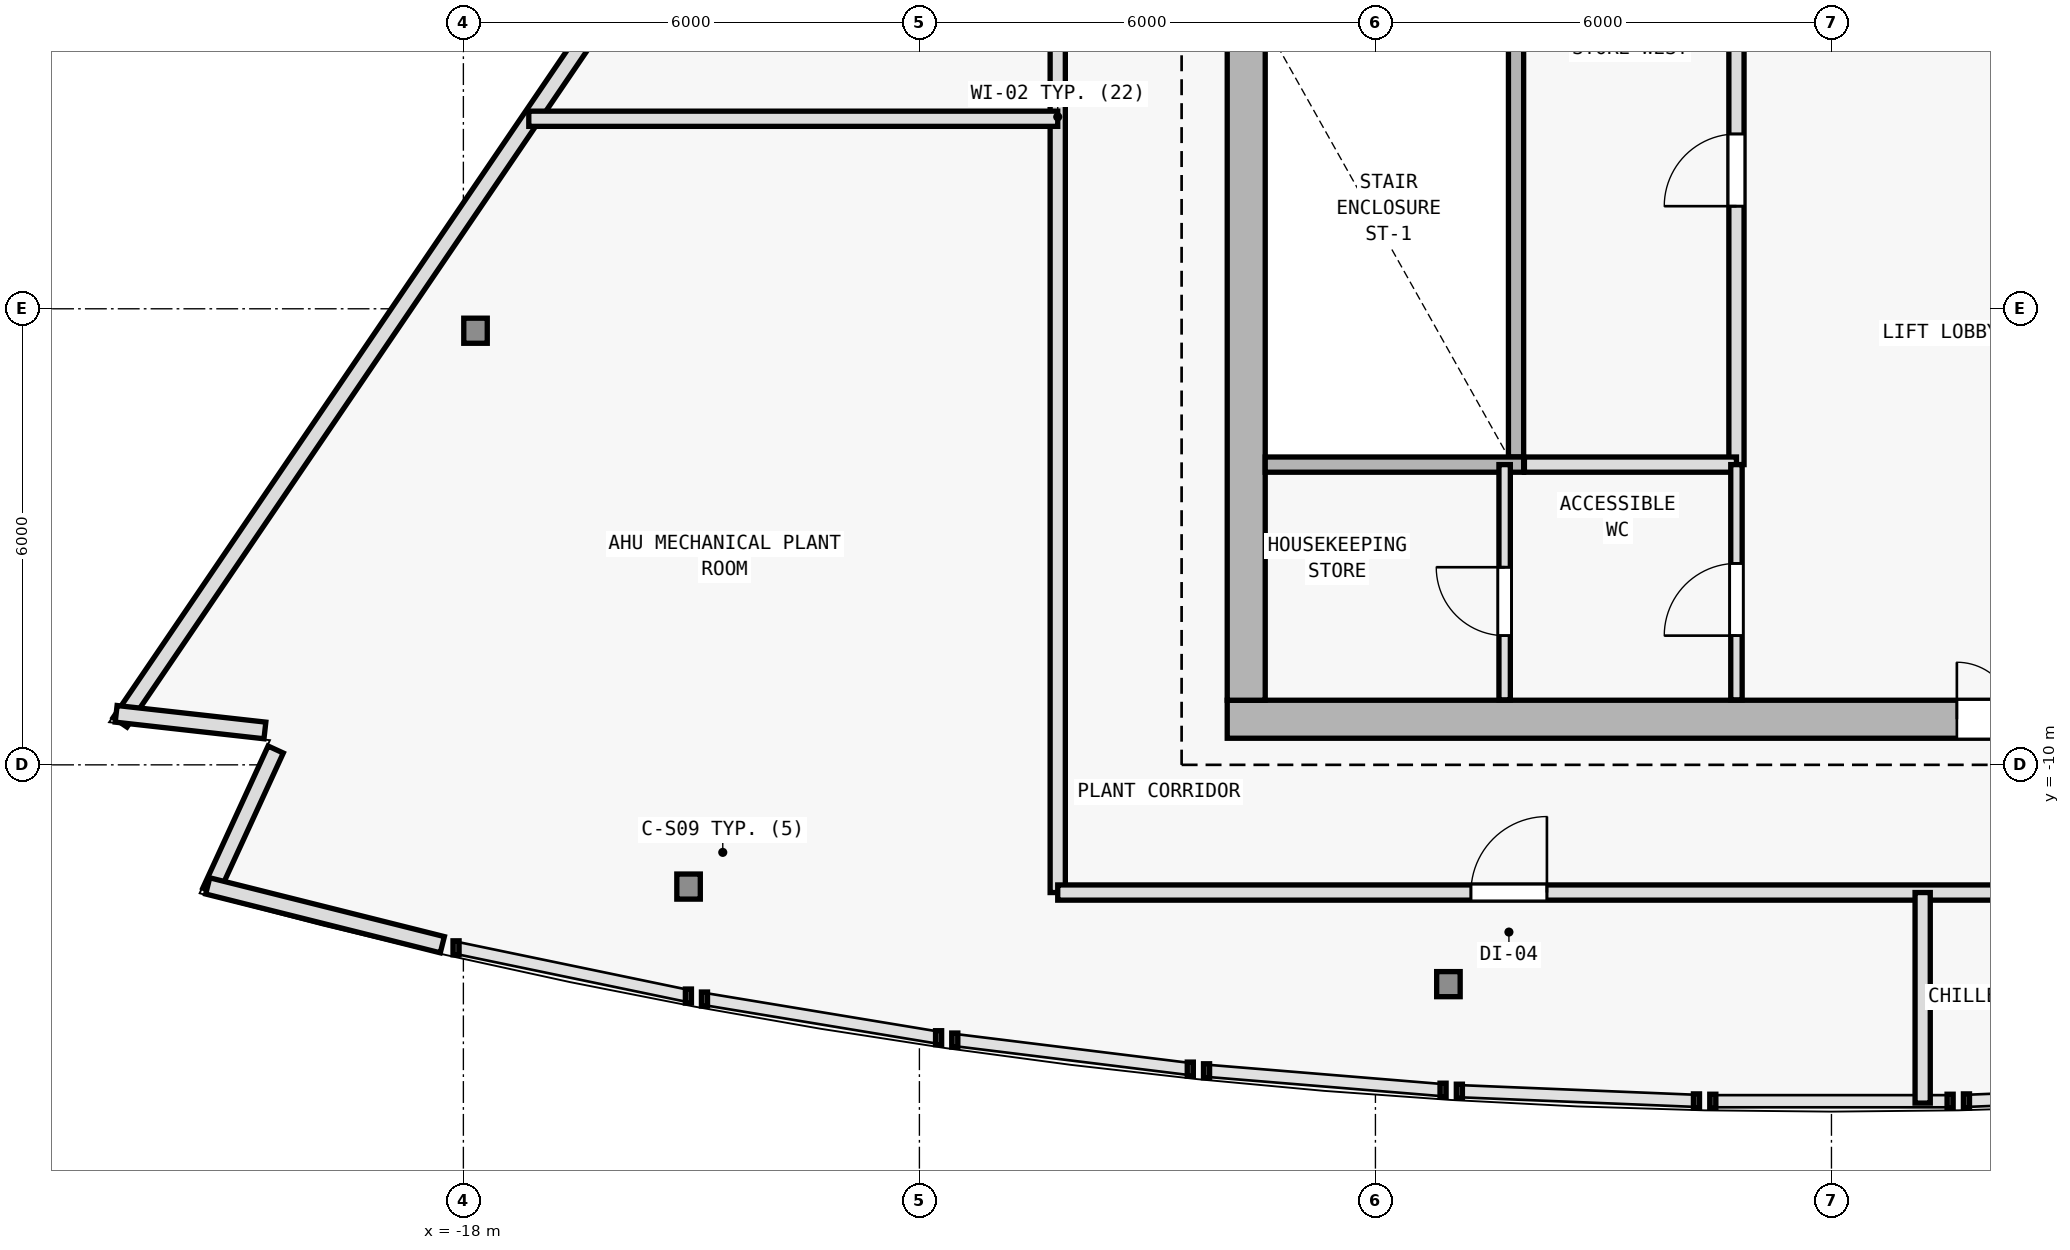
"""IFC4 building model, lengths in metres.
Left out: names, types, materials, properties, quantities, classifications, styles, units other than length and angle.
Written with IfcOpenShell. Run it as: python <this file> out.ifc"""

import sys

from ifc_helpers import new_model, si_unit, direction, frame, frame_2d, origin, origin_2d, place, context, subcontext, project, spatial, rectangle, i_section, extrude, element, fill, save


model = new_model("IFC4")
c1 = context("Model", 3, precision=1e-05, world=origin(), true_north=direction((0.0, 1.0)))
c2 = subcontext(c1, "Body", "Model", "MODEL_VIEW")
j1 = project(units=[si_unit("LENGTHUNIT", "METRE"), si_unit("PLANEANGLEUNIT", "RADIAN")], contexts=[c1])
p1 = place(None, origin())
s1 = spatial("IfcSite", under=j1, at=p1, CompositionType="ELEMENT")
p2 = place(p1, origin())
s2 = spatial("IfcBuilding", under=s1, at=p2, CompositionType="ELEMENT")
p3 = place(p2, frame((0.0, 0.0, 319.2)))
s3 = spatial("IfcBuildingStorey", under=s2, at=p3, CompositionType="ELEMENT", Elevation=319.2)
for number, where, z_axis, x_axis in (
    (1, (-7.7, -9.4, 0.0), (0.0, 0.0, 1.0), (1.0, 0.0, 0.0)),
    (2, (0.0, -9.4, 0.0), (0.0, 0.0, 1.0), (1.0, 0.0, 0.0)),
):
    element("IfcColumn", number, at=place(p3, frame(where, z_axis=z_axis, x_axis=x_axis)), inside=s3, PredefinedType="COLUMN", context=c2, shape_type="SweptSolid", body=[
        extrude(i_section(OverallWidth=0.374, OverallDepth=0.372, WebThickness=0.012, FlangeThickness=0.02, FilletRadius=0.015, at=origin_2d()), origin(), (0.0, 0.0, 1.0), 3.6),
    ])
p4 = place(p3, frame((-15.037, -11.602, 0.0), z_axis=(0.0, 0.0, 1.0), x_axis=(1.0, 0.0, 0.0)))
e3 = element("IfcColumn", 3, at=p4, inside=s3, PredefinedType="COLUMN", context=c2, shape_type="SweptSolid", body=[
    extrude(i_section(OverallWidth=0.309, OverallDepth=0.33, WebThickness=0.011, FlangeThickness=0.019, FilletRadius=0.027, at=origin_2d()), origin(), (0.0, 0.0, 1.0), 1.847),
])
p5 = place(p3, frame((-5.04, -12.885, 0.0), z_axis=(0.0, 0.0, 1.0), x_axis=(1.0, 0.0, 0.0)))
e4 = element("IfcColumn", 4, at=p5, inside=s3, PredefinedType="COLUMN", context=c2, shape_type="SweptSolid", body=[
    extrude(i_section(OverallWidth=0.309, OverallDepth=0.33, WebThickness=0.011, FlangeThickness=0.019, FilletRadius=0.027, at=origin_2d()), origin(), (0.0, 0.0, 1.0), 3.34),
])
p6 = place(p3, frame((-17.84, -4.289, 0.0), z_axis=(0.0, 0.0, 1.0), x_axis=(1.0, 0.0, 0.0)))
e5 = element("IfcColumn", 5, at=p6, inside=s3, PredefinedType="COLUMN", context=c2, shape_type="SweptSolid", body=[
    extrude(i_section(OverallWidth=0.309, OverallDepth=0.33, WebThickness=0.011, FlangeThickness=0.019, FilletRadius=0.027, at=origin_2d()), origin(), (0.0, 0.0, 1.0), 1.23),
])
p7 = place(p3, frame((-22.517, -9.441, 0.0), z_axis=(0.0, 0.0, 1.0), x_axis=(0.562470833944, 0.826817126675, 0.0)))
e6 = element("IfcWall", 6, at=p7, inside=s3, PredefinedType="SOLIDWALL", context=c2, shape_type="SweptSolid", body=[
    extrude(rectangle(XDim=36.623, YDim=0.22, at=frame_2d((18.312, 0.0))), origin(), (0.0, 0.0, 1.0), 2.447),
])
p8 = place(p3, frame((-20.611, -9.548, 0.0), z_axis=(0.0, 0.0, 1.0), x_axis=(-0.993810947327, 0.111084656787, 0.0)))
e7 = element("IfcWall", 7, at=p8, inside=s3, PredefinedType="SOLIDWALL", context=c2, shape_type="SweptSolid", body=[
    extrude(rectangle(XDim=1.969, YDim=0.22, at=frame_2d((0.985, 0.0))), origin(), (0.0, 0.0, 1.0), 0.65),
])
p9 = place(p3, frame((-21.328, -11.667, 0.0), z_axis=(0.0, 0.0, 1.0), x_axis=(0.417431285032, 0.908708491364, 0.0)))
e8 = element("IfcWall", 8, at=p9, inside=s3, PredefinedType="SOLIDWALL", context=c2, shape_type="SweptSolid", body=[
    extrude(rectangle(XDim=2.056, YDim=0.22, at=frame_2d((1.028, 0.0))), origin(), (0.0, 0.0, 1.0), 0.65),
])
p10 = place(p3, frame((-18.277, -12.366, 0.0), z_axis=(0.0, 0.0, 1.0), x_axis=(-0.96999338674, 0.243131301319, 0.0)))
e9 = element("IfcWall", 9, at=p10, inside=s3, PredefinedType="SOLIDWALL", context=c2, shape_type="SweptSolid", body=[
    extrude(rectangle(XDim=3.182, YDim=0.22, at=frame_2d((1.591, 0.0))), origin(), (0.0, 0.0, 1.0), 0.775),
])
p11 = place(p3, frame((-7.95, -9.4, 0.0), z_axis=(0.0, 0.0, 1.0), x_axis=(1.0, 0.0, 0.0)))
e10 = element("IfcWall", 10, at=p11, inside=s3, PredefinedType="SHEAR", context=c2, shape_type="SweptSolid", body=[
    extrude(rectangle(XDim=15.9, YDim=0.5, at=frame_2d((7.95, 0.0))), origin(), (0.0, 0.0, 1.0), 2.4),
])
p12 = place(p11, frame((9.6, 0.0, 0.0)))
e11 = element("IfcOpeningElement", 11, at=p12, cuts=e10, PredefinedType="OPENING", context=c2, shape_type="SweptSolid", body=[
    extrude(rectangle(XDim=1.5, YDim=2.2, at=frame_2d((0.75, 1.1))), frame((0.0, 0.26, 0.0), z_axis=(0.0, -1.0, 0.0), x_axis=(1.0, 0.0, 0.0)), (0.0, 0.0, 1.0), 0.52),
])
p13 = place(p3, frame((-7.7, -9.15, 0.0), z_axis=(0.0, 0.0, 1.0), x_axis=(0.0, 1.0, 0.0)))
e12 = element("IfcWall", 12, at=p13, inside=s3, PredefinedType="SHEAR", context=c2, shape_type="SweptSolid", body=[
    extrude(rectangle(XDim=19.1, YDim=0.5, at=frame_2d((9.55, 0.0))), origin(), (0.0, 0.0, 1.0), 2.4),
])
p14 = place(p13, frame((12.7, 0.0, 0.0)))
e13 = element("IfcOpeningElement", 13, at=p14, cuts=e12, PredefinedType="OPENING", context=c2, shape_type="SweptSolid", body=[
    extrude(rectangle(XDim=1.1, YDim=2.15, at=frame_2d((0.55, 1.075))), frame((0.0, 0.26, 0.0), z_axis=(0.0, -1.0, 0.0), x_axis=(1.0, 0.0, 0.0)), (0.0, 0.0, 1.0), 0.52),
])
p15 = place(p3, frame((-4.15, -5.95, 0.0), z_axis=(0.0, 0.0, 1.0), x_axis=(0.0, 1.0, 0.0)))
e14 = element("IfcWall", 14, at=p15, inside=s3, PredefinedType="SOLIDWALL", context=c2, shape_type="SweptSolid", body=[
    extrude(rectangle(XDim=7.2, YDim=0.2, at=frame_2d((3.6, 0.0))), origin(), (0.0, 0.0, 1.0), 2.4),
])
p16 = place(p3, frame((-1.25, -6.05, 0.0), z_axis=(0.0, 0.0, 1.0), x_axis=(0.0, 1.0, 0.0)))
e15 = element("IfcWall", 15, at=p16, inside=s3, PredefinedType="SOLIDWALL", context=c2, shape_type="SweptSolid", body=[
    extrude(rectangle(XDim=8.7, YDim=0.2, at=frame_2d((4.35, 0.0))), origin(), (0.0, 0.0, 1.0), 2.4),
])
p17 = place(p16, frame((3.4, 0.0, 0.0)))
e16 = element("IfcOpeningElement", 16, at=p17, cuts=e15, PredefinedType="OPENING", context=c2, shape_type="SweptSolid", body=[
    extrude(rectangle(XDim=0.95, YDim=2.1, at=frame_2d((0.475, 1.05))), frame((0.0, 0.11, 0.0), z_axis=(0.0, -1.0, 0.0), x_axis=(1.0, 0.0, 0.0)), (0.0, 0.0, 1.0), 0.22),
])
p18 = place(p3, frame((-7.45, -6.05, 0.0), z_axis=(0.0, 0.0, 1.0), x_axis=(1.0, 0.0, 0.0)))
e17 = element("IfcWall", 17, at=p18, inside=s3, PredefinedType="SOLIDWALL", context=c2, shape_type="SweptSolid", body=[
    extrude(rectangle(XDim=3.4, YDim=0.2, at=frame_2d((1.7, 0.0))), origin(), (0.0, 0.0, 1.0), 2.4),
])
p19 = place(p3, frame((-4.04, -6.05, 0.0), z_axis=(0.0, 0.0, 1.0), x_axis=(1.0, 0.0, 0.0)))
e18 = element("IfcWall", 18, at=p19, inside=s3, PredefinedType="SOLIDWALL", context=c2, shape_type="SweptSolid", body=[
    extrude(rectangle(XDim=2.79, YDim=0.2, at=frame_2d((1.395, 0.0))), origin(), (0.0, 0.0, 1.0), 2.4),
])
p20 = place(p3, frame((-1.25, -9.145, 0.0), z_axis=(0.0, 0.0, 1.0), x_axis=(0.0, 1.0, 0.0)))
e19 = element("IfcWall", 19, at=p20, inside=s3, PredefinedType="PARTITIONING", context=c2, shape_type="SweptSolid", body=[
    extrude(rectangle(XDim=3.095, YDim=0.15, at=frame_2d((1.547, 0.0))), origin(), (0.0, 0.0, 1.0), 2.4),
])
p21 = place(p20, frame((0.845, 0.0, 0.0)))
e20 = element("IfcOpeningElement", 20, at=p21, cuts=e19, PredefinedType="OPENING", context=c2, shape_type="SweptSolid", body=[
    extrude(rectangle(XDim=0.95, YDim=2.1, at=frame_2d((0.475, 1.05))), frame((0.0, 0.085, 0.0), z_axis=(0.0, -1.0, 0.0), x_axis=(1.0, 0.0, 0.0)), (0.0, 0.0, 1.0), 0.17),
])
p22 = place(p3, frame((-4.3, -9.145, 0.0), z_axis=(0.0, 0.0, 1.0), x_axis=(0.0, 1.0, 0.0)))
e21 = element("IfcWall", 21, at=p22, inside=s3, PredefinedType="PARTITIONING", context=c2, shape_type="SweptSolid", body=[
    extrude(rectangle(XDim=3.095, YDim=0.15, at=frame_2d((1.547, 0.0))), origin(), (0.0, 0.0, 1.0), 2.4),
])
p23 = place(p22, frame((0.845, 0.0, 0.0)))
e22 = element("IfcOpeningElement", 22, at=p23, cuts=e21, PredefinedType="OPENING", context=c2, shape_type="SweptSolid", body=[
    extrude(rectangle(XDim=0.9, YDim=2.1, at=frame_2d((0.45, 1.05))), frame((0.0, 0.085, 0.0), z_axis=(0.0, -1.0, 0.0), x_axis=(1.0, 0.0, 0.0)), (0.0, 0.0, 1.0), 0.17),
])
p24 = place(p3, frame((-10.18, -11.68, 0.0), z_axis=(0.0, 0.0, 1.0), x_axis=(0.0, 1.0, 0.0)))
e23 = element("IfcWall", 23, at=p24, inside=s3, PredefinedType="SOLIDWALL", context=c2, shape_type="SweptSolid", body=[
    extrude(rectangle(XDim=20.41, YDim=0.2, at=frame_2d((10.205, 0.0))), origin(), (0.0, 0.0, 1.0), 2.4),
])
p25 = place(p24, frame((12.83, 0.0, 0.0)))
e24 = element("IfcOpeningElement", 24, at=p25, cuts=e23, PredefinedType="OPENING", context=c2, shape_type="SweptSolid", body=[
    extrude(rectangle(XDim=1.0, YDim=2.15, at=frame_2d((0.5, 1.075))), frame((0.0, 0.11, 0.0), z_axis=(0.0, -1.0, 0.0), x_axis=(1.0, 0.0, 0.0)), (0.0, 0.0, 1.0), 0.22),
])
p26 = place(p3, frame((-10.18, -11.68, 0.0), z_axis=(0.0, 0.0, 1.0), x_axis=(1.0, 0.0, 0.0)))
e25 = element("IfcWall", 25, at=p26, inside=s3, PredefinedType="SOLIDWALL", context=c2, shape_type="SweptSolid", body=[
    extrude(rectangle(XDim=18.13, YDim=0.2, at=frame_2d((9.065, 0.0))), origin(), (0.0, 0.0, 1.0), 2.4),
])
p27 = place(p26, frame((5.436, 0.0, 0.0)))
e26 = element("IfcOpeningElement", 26, at=p27, cuts=e25, PredefinedType="OPENING", context=c2, shape_type="SweptSolid", body=[
    extrude(rectangle(XDim=1.0, YDim=2.15, at=frame_2d((0.5, 1.075))), frame((0.0, 0.11, 0.0), z_axis=(0.0, -1.0, 0.0), x_axis=(1.0, 0.0, 0.0)), (0.0, 0.0, 1.0), 0.22),
])
p28 = place(p26, frame((14.189, 0.0, 0.0)))
e27 = element("IfcOpeningElement", 27, at=p28, cuts=e25, PredefinedType="OPENING", context=c2, shape_type="SweptSolid", body=[
    extrude(rectangle(XDim=1.0, YDim=2.15, at=frame_2d((0.5, 1.075))), frame((0.0, 0.11, 0.0), z_axis=(0.0, -1.0, 0.0), x_axis=(1.0, 0.0, 0.0)), (0.0, 0.0, 1.0), 0.22),
])
p29 = place(p3, frame((-17.139, -1.5, 0.0), z_axis=(0.0, 0.0, 1.0), x_axis=(1.0, 0.0, 0.0)))
e28 = element("IfcWall", 28, at=p29, inside=s3, PredefinedType="SOLIDWALL", context=c2, shape_type="SweptSolid", body=[
    extrude(rectangle(XDim=6.959, YDim=0.2, at=frame_2d((3.48, 0.0))), origin(), (0.0, 0.0, 1.0), 2.4),
])
p30 = place(p3, frame((1.2, -14.45, 0.0), z_axis=(0.0, 0.0, 1.0), x_axis=(0.0, 1.0, 0.0)))
e29 = element("IfcWall", 29, at=p30, inside=s3, PredefinedType="SOLIDWALL", context=c2, shape_type="SweptSolid", body=[
    extrude(rectangle(XDim=2.77, YDim=0.2, at=frame_2d((1.385, 0.0))), origin(), (0.0, 0.0, 1.0), 2.4),
])
p31 = place(p12, origin())
e30 = element("IfcDoor", 30, at=p31, inside=s3, OperationType="DOUBLE_DOOR_SINGLE_SWING", PredefinedType="DOOR", context=c2, shape_type="SweptSolid", body=[
    extrude(rectangle(XDim=1.5, YDim=2.2, at=frame_2d((0.75, 1.1))), frame((0.0, 0.025, 0.0), z_axis=(0.0, -1.0, 0.0), x_axis=(1.0, 0.0, 0.0)), (0.0, 0.0, 1.0), 0.05),
])
fill(e11, e30)
p32 = place(p17, origin())
e31 = element("IfcDoor", 31, at=p32, inside=s3, OperationType="SINGLE_SWING_LEFT", PredefinedType="DOOR", context=c2, shape_type="SweptSolid", body=[
    extrude(rectangle(XDim=0.95, YDim=2.1, at=frame_2d((0.475, 1.05))), frame((0.0, 0.025, 0.0), z_axis=(0.0, -1.0, 0.0), x_axis=(1.0, 0.0, 0.0)), (0.0, 0.0, 1.0), 0.05),
])
fill(e16, e31)
p33 = place(p21, origin())
e32 = element("IfcDoor", 32, at=p33, inside=s3, OperationType="SINGLE_SWING_LEFT", PredefinedType="DOOR", context=c2, shape_type="SweptSolid", body=[
    extrude(rectangle(XDim=0.95, YDim=2.1, at=frame_2d((0.475, 1.05))), frame((0.0, 0.025, 0.0), z_axis=(0.0, -1.0, 0.0), x_axis=(1.0, 0.0, 0.0)), (0.0, 0.0, 1.0), 0.05),
])
fill(e20, e32)
p34 = place(p23, origin())
e33 = element("IfcDoor", 33, at=p34, inside=s3, OperationType="SINGLE_SWING_RIGHT", PredefinedType="DOOR", context=c2, shape_type="SweptSolid", body=[
    extrude(rectangle(XDim=0.9, YDim=2.1, at=frame_2d((0.45, 1.05))), frame((0.0, 0.025, 0.0), z_axis=(0.0, -1.0, 0.0), x_axis=(1.0, 0.0, 0.0)), (0.0, 0.0, 1.0), 0.05),
])
fill(e22, e33)
p35 = place(p27, origin())
e34 = element("IfcDoor", 34, at=p35, inside=s3, OperationType="SINGLE_SWING_RIGHT", PredefinedType="DOOR", context=c2, shape_type="SweptSolid", body=[
    extrude(rectangle(XDim=1.0, YDim=2.15, at=frame_2d((0.5, 1.075))), frame((0.0, 0.025, 0.0), z_axis=(0.0, -1.0, 0.0), x_axis=(1.0, 0.0, 0.0)), (0.0, 0.0, 1.0), 0.05),
])
fill(e26, e34)
save(model, sys.argv[1])
